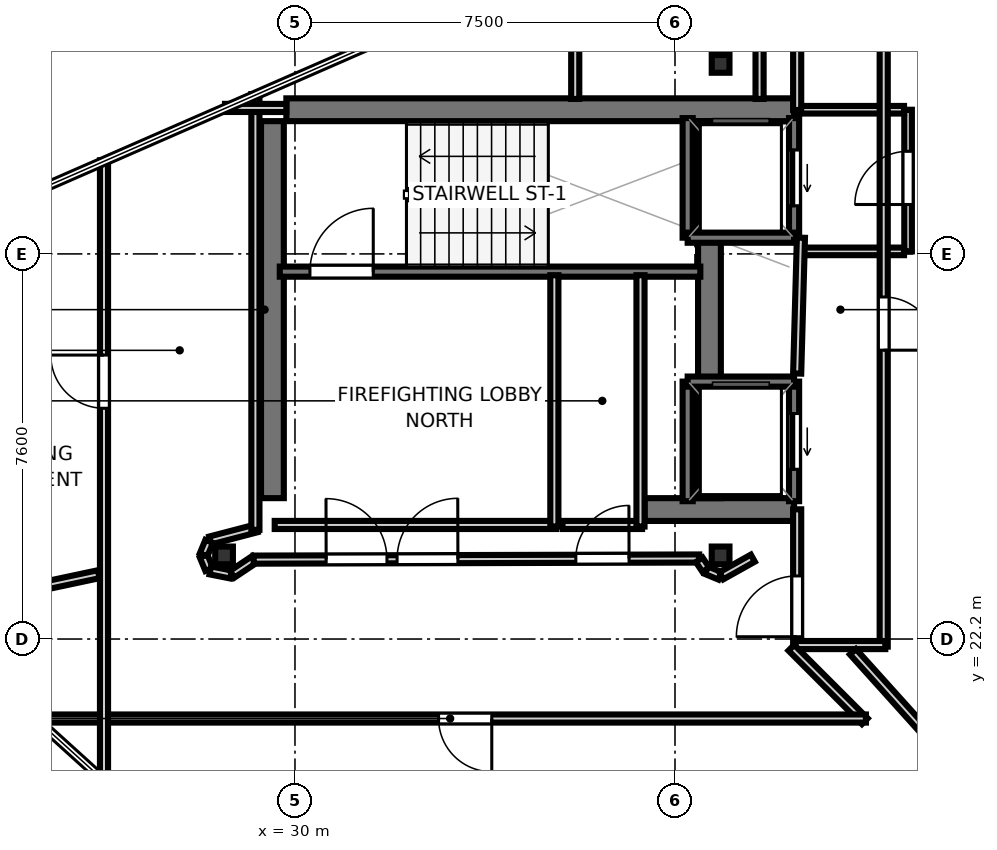
"""IFC4 building model, lengths in metres.
Left out: names, types, materials, properties, quantities, classifications, styles, units other than length and angle.
Written with IfcOpenShell. Run it as: python <this file> out.ifc"""

import sys

from ifc_helpers import new_model, si_unit, direction, frame, frame_2d, origin, origin_2d, place, context, subcontext, project, spatial, rectangle, i_section, extrude, element, fill, save


model = new_model("IFC4")
c1 = context("Model", 3, precision=1e-05, world=origin(), true_north=direction((0.0, 1.0)))
c2 = subcontext(c1, "Body", "Model", "MODEL_VIEW")
j1 = project(units=[si_unit("LENGTHUNIT", "METRE"), si_unit("PLANEANGLEUNIT", "RADIAN")], contexts=[c1])
p1 = place(None, origin())
s1 = spatial("IfcSite", under=j1, at=p1, CompositionType="ELEMENT")
p2 = place(p1, origin())
s2 = spatial("IfcBuilding", under=s1, at=p2, CompositionType="ELEMENT")
p3 = place(p2, frame((0.0, 0.0, 363.8)))
s3 = spatial("IfcBuildingStorey", under=s2, at=p3, CompositionType="ELEMENT", Elevation=363.8)
p4 = place(p3, frame((29.83, 32.645, 0.0), z_axis=(0.0, 0.0, 1.0), x_axis=(1.0, 0.0, 0.0)))
e1 = element("IfcWall", 1, at=p4, inside=s3, PredefinedType="SHEAR", context=c2, shape_type="SweptSolid", body=[
    extrude(rectangle(XDim=10.02, YDim=0.45, at=frame_2d((5.01, 0.0))), origin(), (0.0, 0.0, 1.0), 3.55),
])
p5 = place(p3, frame((36.9, 24.755, 0.0), z_axis=(0.0, 0.0, 1.0), x_axis=(1.0, 0.0, 0.0)))
e2 = element("IfcWall", 2, at=p5, inside=s3, PredefinedType="SHEAR", context=c2, shape_type="SweptSolid", body=[
    extrude(rectangle(XDim=2.95, YDim=0.45, at=frame_2d((1.475, 0.0))), origin(), (0.0, 0.0, 1.0), 3.55),
])
for number, where, z_axis, x_axis in (
    (3, (29.555, 24.98, 0.0), (0.0, 0.0, 1.0), (0.0, 1.0, 0.0)),
    (4, (38.18, 24.98, 0.0), (0.0, 0.0, 1.0), (0.0, 1.0, 0.0)),
):
    element("IfcWall", number, at=place(p3, frame(where, z_axis=z_axis, x_axis=x_axis)), inside=s3, PredefinedType="SHEAR", context=c2, shape_type="SweptSolid", body=[
        extrude(rectangle(XDim=7.44, YDim=0.45, at=frame_2d((3.72, 0.0))), origin(), (0.0, 0.0, 1.0), 3.55),
    ])
for number, where, z_axis, x_axis in (
    (5, (28.6, 23.85, 0.0), (0.0, 0.0, 1.0), (1.0, 0.0, 0.0)),
    (6, (38.4, 33.55, 0.0), (0.0, 0.0, 1.0), (1.0, 0.0, 0.0)),
    (7, (38.4, 23.85, 0.0), (0.0, 0.0, 1.0), (1.0, 0.0, 0.0)),
):
    element("IfcColumn", number, at=place(p3, frame(where, z_axis=z_axis, x_axis=x_axis)), inside=s3, PredefinedType="COLUMN", context=c2, shape_type="SweptSolid", body=[
        extrude(i_section(OverallWidth=0.35, OverallDepth=0.35, WebThickness=0.012, FlangeThickness=0.019, at=origin_2d()), origin(), (0.0, 0.0, 1.0), 3.75),
    ])
p6 = place(p3, frame((29.7, 29.45, 0.0), z_axis=(0.0, 0.0, 1.0), x_axis=(1.0, 0.0, 0.0)))
e8 = element("IfcWall", 8, at=p6, inside=s3, PredefinedType="SOLIDWALL", context=c2, shape_type="SweptSolid", body=[
    extrude(rectangle(XDim=8.3, YDim=0.2, at=frame_2d((4.15, 0.0))), origin(), (0.0, 0.0, 1.0), 3.55),
])
p7 = place(p6, frame((0.595, 0.0, 0.0)))
e9 = element("IfcOpeningElement", 9, at=p7, cuts=e8, PredefinedType="OPENING", context=c2, shape_type="SweptSolid", body=[
    extrude(rectangle(XDim=1.25, YDim=2.15, at=frame_2d((0.625, 1.075))), frame((0.0, 0.11, 0.0), z_axis=(0.0, -1.0, 0.0), x_axis=(1.0, 0.0, 0.0)), (0.0, 0.0, 1.0), 0.22),
])
p8 = place(p3, frame((39.85, 30.12, 0.0), z_axis=(0.0, 0.0, 1.0), x_axis=(0.0, 1.0, 0.0)))
e10 = element("IfcWall", 10, at=p8, inside=s3, PredefinedType="SOLIDWALL", context=c2, shape_type="SweptSolid", body=[
    extrude(rectangle(XDim=2.36, YDim=0.2, at=frame_2d((1.18, 0.0))), origin(), (0.0, 0.0, 1.0), 3.55),
])
p9 = place(p8, frame((0.63, 0.0, 0.0)))
e11 = element("IfcOpeningElement", 11, at=p9, cuts=e10, PredefinedType="OPENING", context=c2, shape_type="SweptSolid", body=[
    extrude(rectangle(XDim=1.1, YDim=2.15, at=frame_2d((0.55, 1.075))), frame((0.0, 0.11, 0.0), z_axis=(0.0, -1.0, 0.0), x_axis=(1.0, 0.0, 0.0)), (0.0, 0.0, 1.0), 0.22),
])
p10 = place(p3, frame((37.75, 30.12, 0.0), z_axis=(0.0, 0.0, 1.0), x_axis=(0.0, 1.0, 0.0)))
e12 = element("IfcWall", 12, at=p10, inside=s3, PredefinedType="SOLIDWALL", context=c2, shape_type="SweptSolid", body=[
    extrude(rectangle(XDim=2.36, YDim=0.2, at=frame_2d((1.18, 0.0))), origin(), (0.0, 0.0, 1.0), 3.55),
])
p11 = place(p3, frame((37.75, 30.12, 0.0), z_axis=(0.0, 0.0, 1.0), x_axis=(1.0, 0.0, 0.0)))
e13 = element("IfcWall", 13, at=p11, inside=s3, PredefinedType="SOLIDWALL", context=c2, shape_type="SweptSolid", body=[
    extrude(rectangle(XDim=2.1, YDim=0.2, at=frame_2d((1.05, 0.0))), origin(), (0.0, 0.0, 1.0), 3.55),
])
p12 = place(p3, frame((39.85, 24.92, 0.0), z_axis=(0.0, 0.0, 1.0), x_axis=(0.0, 1.0, 0.0)))
e14 = element("IfcWall", 14, at=p12, inside=s3, PredefinedType="SOLIDWALL", context=c2, shape_type="SweptSolid", body=[
    extrude(rectangle(XDim=2.36, YDim=0.2, at=frame_2d((1.18, 0.0))), origin(), (0.0, 0.0, 1.0), 3.55),
])
p13 = place(p12, frame((0.63, 0.0, 0.0)))
e15 = element("IfcOpeningElement", 15, at=p13, cuts=e14, PredefinedType="OPENING", context=c2, shape_type="SweptSolid", body=[
    extrude(rectangle(XDim=1.1, YDim=2.15, at=frame_2d((0.55, 1.075))), frame((0.0, 0.11, 0.0), z_axis=(0.0, -1.0, 0.0), x_axis=(1.0, 0.0, 0.0)), (0.0, 0.0, 1.0), 0.22),
])
p14 = place(p3, frame((37.75, 24.92, 0.0), z_axis=(0.0, 0.0, 1.0), x_axis=(0.0, 1.0, 0.0)))
e16 = element("IfcWall", 16, at=p14, inside=s3, PredefinedType="SOLIDWALL", context=c2, shape_type="SweptSolid", body=[
    extrude(rectangle(XDim=2.36, YDim=0.2, at=frame_2d((1.18, 0.0))), origin(), (0.0, 0.0, 1.0), 3.55),
])
p15 = place(p3, frame((37.75, 27.28, 0.0), z_axis=(0.0, 0.0, 1.0), x_axis=(1.0, 0.0, 0.0)))
e17 = element("IfcWall", 17, at=p15, inside=s3, PredefinedType="SOLIDWALL", context=c2, shape_type="SweptSolid", body=[
    extrude(rectangle(XDim=2.1, YDim=0.2, at=frame_2d((1.05, 0.0))), origin(), (0.0, 0.0, 1.0), 3.55),
])
p16 = place(p3, frame((42.1, 29.85, 0.0), z_axis=(0.0, 0.0, 1.0), x_axis=(0.0, 1.0, 0.0)))
e18 = element("IfcWall", 18, at=p16, inside=s3, PredefinedType="PARTITIONING", context=c2, shape_type="SweptSolid", body=[
    extrude(rectangle(XDim=2.795, YDim=0.15, at=frame_2d((1.397, 0.0))), origin(), (0.0, 0.0, 1.0), 2.87),
])
p17 = place(p16, frame((0.925, 0.0, 0.0)))
e19 = element("IfcOpeningElement", 19, at=p17, cuts=e18, PredefinedType="OPENING", context=c2, shape_type="SweptSolid", body=[
    extrude(rectangle(XDim=1.05, YDim=2.15, at=frame_2d((0.525, 1.075))), frame((0.0, 0.085, 0.0), z_axis=(0.0, -1.0, 0.0), x_axis=(1.0, 0.0, 0.0)), (0.0, 0.0, 1.0), 0.17),
])
for number, where, z_axis, x_axis in (
    (20, (39.96, 29.85, 0.0), (0.0, 0.0, 1.0), (1.0, 0.0, 0.0)),
    (21, (39.96, 32.645, 0.0), (0.0, 0.0, 1.0), (1.0, 0.0, 0.0)),
):
    element("IfcWall", number, at=place(p3, frame(where, z_axis=z_axis, x_axis=x_axis)), inside=s3, PredefinedType="PARTITIONING", context=c2, shape_type="SweptSolid", body=[
        extrude(rectangle(XDim=2.06, YDim=0.15, at=frame_2d((1.03, 0.0))), origin(), (0.0, 0.0, 1.0), 2.87),
    ])
p18 = place(p3, frame((35.15, 24.451, 0.0), z_axis=(0.0, 0.0, 1.0), x_axis=(-1.0, 0.0, 0.0)))
e22 = element("IfcWall", 22, at=p18, inside=s3, PredefinedType="PARTITIONING", context=c2, shape_type="SweptSolid", body=[
    extrude(rectangle(XDim=5.55, YDim=0.16, at=frame_2d((2.775, 0.0))), origin(), (0.0, 0.0, 1.0), 2.87),
])
p19 = place(p3, frame((35.119, 29.38, 0.0), z_axis=(0.0, 0.0, 1.0), x_axis=(0.0, -1.0, 0.0)))
e23 = element("IfcWall", 23, at=p19, inside=s3, PredefinedType="PARTITIONING", context=c2, shape_type="SweptSolid", body=[
    extrude(rectangle(XDim=4.96, YDim=0.16, at=frame_2d((2.48, 0.0))), origin(), (0.0, 0.0, 1.0), 2.08),
])
p20 = place(p3, frame((39.911, 22.05, 0.0), z_axis=(0.0, 0.0, 1.0), x_axis=(0.0, 1.0, 0.0)))
e24 = element("IfcWall", 24, at=p20, inside=s3, PredefinedType="PARTITIONING", context=c2, shape_type="SweptSolid", body=[
    extrude(rectangle(XDim=2.71, YDim=0.16, at=frame_2d((1.355, 0.0))), origin(), (0.0, 0.0, 1.0), 2.87),
])
p21 = place(p20, frame((0.195, 0.0, 0.0)))
e25 = element("IfcOpeningElement", 25, at=p21, cuts=e24, PredefinedType="OPENING", context=c2, shape_type="SweptSolid", body=[
    extrude(rectangle(XDim=1.2, YDim=2.15, at=frame_2d((0.6, 1.075))), frame((0.0, 0.09, 0.0), z_axis=(0.0, -1.0, 0.0), x_axis=(1.0, 0.0, 0.0)), (0.0, 0.0, 1.0), 0.18),
])
p22 = place(p3, frame((39.911, 27.439, 0.0), z_axis=(0.0, 0.0, 1.0), x_axis=(0.027673579092, 0.999617013171, 0.0)))
e26 = element("IfcWall", 26, at=p22, inside=s3, PredefinedType="PARTITIONING", context=c2, shape_type="SweptSolid", body=[
    extrude(rectangle(XDim=2.682, YDim=0.16, at=frame_2d((1.341, 0.0))), origin(), (0.0, 0.0, 1.0), 2.87),
])
p23 = place(p3, frame((39.911, 32.64, 0.0), z_axis=(0.0, 0.0, 1.0), x_axis=(0.0, 1.0, 0.0)))
e27 = element("IfcWall", 27, at=p23, inside=s3, PredefinedType="PARTITIONING", context=c2, shape_type="SweptSolid", body=[
    extrude(rectangle(XDim=2.16, YDim=0.16, at=frame_2d((1.08, 0.0))), origin(), (0.0, 0.0, 1.0), 2.87),
])
p24 = place(p3, frame((41.619, 34.8, 0.0), z_axis=(0.0, 0.0, 1.0), x_axis=(0.0, -1.0, 0.0)))
e28 = element("IfcWall", 28, at=p24, inside=s3, PredefinedType="PARTITIONING", context=c2, shape_type="SweptSolid", body=[
    extrude(rectangle(XDim=12.75, YDim=0.16, at=frame_2d((6.375, 0.0))), origin(), (0.0, 0.0, 1.0), 2.87),
])
p25 = place(p24, frame((5.85, 0.0, 0.0)))
e29 = element("IfcOpeningElement", 29, at=p25, cuts=e28, PredefinedType="OPENING", context=c2, shape_type="SweptSolid", body=[
    extrude(rectangle(XDim=1.05, YDim=2.15, at=frame_2d((0.525, 1.075))), frame((0.0, 0.09, 0.0), z_axis=(0.0, -1.0, 0.0), x_axis=(1.0, 0.0, 0.0)), (0.0, 0.0, 1.0), 0.18),
])
p26 = place(p3, frame((41.65, 22.081, 0.0), z_axis=(0.0, 0.0, 1.0), x_axis=(-1.0, 0.0, 0.0)))
e30 = element("IfcWall", 30, at=p26, inside=s3, PredefinedType="PARTITIONING", context=c2, shape_type="SweptSolid", body=[
    extrude(rectangle(XDim=1.77, YDim=0.16, at=frame_2d((0.885, 0.0))), origin(), (0.0, 0.0, 1.0), 2.87),
])
p27 = place(p3, frame((36.85, 24.451, 0.0), z_axis=(0.0, 0.0, 1.0), x_axis=(-1.0, 0.0, 0.0)))
e31 = element("IfcWall", 31, at=p27, inside=s3, PredefinedType="PARTITIONING", context=c2, shape_type="SweptSolid", body=[
    extrude(rectangle(XDim=1.57, YDim=0.16, at=frame_2d((0.785, 0.0))), origin(), (0.0, 0.0, 1.0), 2.87),
])
p28 = place(p3, frame((36.819, 29.38, 0.0), z_axis=(0.0, 0.0, 1.0), x_axis=(0.0, -1.0, 0.0)))
e32 = element("IfcWall", 32, at=p28, inside=s3, PredefinedType="PARTITIONING", context=c2, shape_type="SweptSolid", body=[
    extrude(rectangle(XDim=4.96, YDim=0.16, at=frame_2d((2.48, 0.0))), origin(), (0.0, 0.0, 1.0), 2.87),
])
p29 = place(p3, frame((35.531, 32.858, 0.0), z_axis=(0.0, 0.0, 1.0), x_axis=(0.0, 1.0, 0.0)))
e33 = element("IfcWall", 33, at=p29, inside=s3, PredefinedType="PARTITIONING", context=c2, shape_type="SweptSolid", body=[
    extrude(rectangle(XDim=2.856, YDim=0.16, at=frame_2d((1.428, 0.0))), origin(), (0.0, 0.0, 1.0), 2.87),
])
p30 = place(p3, frame((39.169, 35.1, 0.0), z_axis=(0.0, 0.0, 1.0), x_axis=(0.0, -1.0, 0.0)))
e34 = element("IfcWall", 34, at=p30, inside=s3, PredefinedType="PARTITIONING", context=c2, shape_type="SweptSolid", body=[
    extrude(rectangle(XDim=2.242, YDim=0.16, at=frame_2d((1.121, 0.0))), origin(), (0.0, 0.0, 1.0), 2.87),
])
p31 = place(p3, frame((29.242, 24.384, 0.0), z_axis=(0.0, 0.0, 1.0), x_axis=(-0.967554205956, -0.252663528309, 0.0)))
e35 = element("IfcWall", 35, at=p31, inside=s3, PredefinedType="PARTITIONING", context=c2, shape_type="SweptSolid", body=[
    extrude(rectangle(XDim=0.946, YDim=0.16, at=frame_2d((0.473, 0.0))), origin(), (0.0, 0.0, 1.0), 2.87),
])
for number, where, z_axis, x_axis in (
    (36, (28.306, 24.127, 0.0), (0.0, 0.0, 1.0), (-0.383, -0.924, 0.0)),
    (37, (28.196, 23.838, 0.0), (0.0, 0.0, 1.0), (0.383, -0.924, 0.0)),
):
    element("IfcWall", number, at=place(p3, frame(where, z_axis=z_axis, x_axis=x_axis)), inside=s3, PredefinedType="PARTITIONING", context=c2, shape_type="SweptSolid", body=[
        extrude(rectangle(XDim=0.287, YDim=0.16, at=frame_2d((0.144, 0.0))), origin(), (0.0, 0.0, 1.0), 2.87),
    ])
p32 = place(p3, frame((28.329, 23.554, 0.0), z_axis=(0.0, 0.0, 1.0), x_axis=(0.980782960085, -0.195101986683, 0.0)))
e38 = element("IfcWall", 38, at=p32, inside=s3, PredefinedType="PARTITIONING", context=c2, shape_type="SweptSolid", body=[
    extrude(rectangle(XDim=0.417, YDim=0.16, at=frame_2d((0.208, 0.0))), origin(), (0.0, 0.0, 1.0), 2.87),
])
p33 = place(p3, frame((28.761, 23.478, 0.0), z_axis=(0.0, 0.0, 1.0), x_axis=(0.831482899293, 0.555550347118, 0.0)))
e39 = element("IfcWall", 39, at=p33, inside=s3, PredefinedType="PARTITIONING", context=c2, shape_type="SweptSolid", body=[
    extrude(rectangle(XDim=0.53, YDim=0.16, at=frame_2d((0.265, 0.0))), origin(), (0.0, 0.0, 1.0), 2.87),
])
p34 = place(p3, frame((29.184, 23.767, 0.0), z_axis=(0.0, 0.0, 1.0), x_axis=(0.999996878137, 0.002498742824, 0.0)))
e40 = element("IfcWall", 40, at=p34, inside=s3, PredefinedType="PARTITIONING", context=c2, shape_type="SweptSolid", body=[
    extrude(rectangle(XDim=8.793, YDim=0.16, at=frame_2d((4.397, 0.0))), origin(), (0.0, 0.0, 1.0), 2.87),
])
p35 = place(p34, frame((2.831, 0.0, 0.0)))
e41 = element("IfcOpeningElement", 41, at=p35, cuts=e40, PredefinedType="OPENING", context=c2, shape_type="SweptSolid", body=[
    extrude(rectangle(XDim=1.2, YDim=2.15, at=frame_2d((0.6, 1.075))), frame((0.0, 0.09, 0.0), z_axis=(0.0, -1.0, 0.0), x_axis=(1.0, 0.0, 0.0)), (0.0, 0.0, 1.0), 0.18),
])
p36 = place(p34, frame((6.359, 0.0, 0.0)))
e42 = element("IfcOpeningElement", 42, at=p36, cuts=e40, PredefinedType="OPENING", context=c2, shape_type="SweptSolid", body=[
    extrude(rectangle(XDim=1.05, YDim=2.15, at=frame_2d((0.525, 1.075))), frame((0.0, 0.09, 0.0), z_axis=(0.0, -1.0, 0.0), x_axis=(1.0, 0.0, 0.0)), (0.0, 0.0, 1.0), 0.18),
])
p37 = place(p34, frame((1.431, 0.0, 0.0)))
e43 = element("IfcOpeningElement", 43, at=p37, cuts=e40, PredefinedType="OPENING", context=c2, shape_type="SweptSolid", body=[
    extrude(rectangle(XDim=1.2, YDim=2.15, at=frame_2d((0.6, 1.075))), frame((0.0, 0.09, 0.0), z_axis=(0.0, -1.0, 0.0), x_axis=(1.0, 0.0, 0.0)), (0.0, 0.0, 1.0), 0.18),
])
p38 = place(p3, frame((37.978, 23.764, 0.0), z_axis=(0.0, 0.0, 1.0), x_axis=(0.556130652598, -0.831094878604, 0.0)))
e44 = element("IfcWall", 44, at=p38, inside=s3, PredefinedType="PARTITIONING", context=c2, shape_type="SweptSolid", body=[
    extrude(rectangle(XDim=0.236, YDim=0.16, at=frame_2d((0.118, 0.0))), origin(), (0.0, 0.0, 1.0), 2.87),
])
p39 = place(p3, frame((38.123, 23.556, 0.0), z_axis=(0.0, 0.0, 1.0), x_axis=(0.92383017907, -0.382802560388, 0.0)))
e45 = element("IfcWall", 45, at=p39, inside=s3, PredefinedType="PARTITIONING", context=c2, shape_type="SweptSolid", body=[
    extrude(rectangle(XDim=0.287, YDim=0.16, at=frame_2d((0.144, 0.0))), origin(), (0.0, 0.0, 1.0), 2.87),
])
p40 = place(p3, frame((38.415, 23.448, 0.0), z_axis=(0.0, 0.0, 1.0), x_axis=(0.872599584194, 0.488436245241, 0.0)))
e46 = element("IfcWall", 46, at=p40, inside=s3, PredefinedType="PARTITIONING", context=c2, shape_type="SweptSolid", body=[
    extrude(rectangle(XDim=0.712, YDim=0.16, at=frame_2d((0.356, 0.0))), origin(), (0.0, 0.0, 1.0), 2.87),
])
p41 = place(p3, frame((39.796, 22.028, 0.0), z_axis=(0.0, 0.0, 1.0), x_axis=(0.707106781187, -0.707106781187, 0.0)))
e47 = element("IfcWall", 47, at=p41, inside=s3, PredefinedType="PARTITIONING", context=c2, shape_type="SweptSolid", body=[
    extrude(rectangle(XDim=2.051, YDim=0.16, at=frame_2d((1.025, 0.0))), origin(), (0.0, 0.0, 1.0), 2.87),
])
p42 = place(p3, frame((41.268, 20.631, 0.0), z_axis=(0.0, 0.0, 1.0), x_axis=(-1.0, 0.0, 0.0)))
e48 = element("IfcWall", 48, at=p42, inside=s3, PredefinedType="PARTITIONING", context=c2, shape_type="SweptSolid", body=[
    extrude(rectangle(XDim=16.412, YDim=0.16, at=frame_2d((8.206, 0.0))), origin(), (0.0, 0.0, 1.0), 2.87),
])
p43 = place(p42, frame((7.384, 0.0, 0.0)))
e49 = element("IfcOpeningElement", 49, at=p43, cuts=e48, PredefinedType="OPENING", context=c2, shape_type="SweptSolid", body=[
    extrude(rectangle(XDim=1.05, YDim=2.15, at=frame_2d((0.525, 1.075))), frame((0.0, 0.09, 0.0), z_axis=(0.0, -1.0, 0.0), x_axis=(1.0, 0.0, 0.0)), (0.0, 0.0, 1.0), 0.18),
])
p44 = place(p3, frame((26.231, 19.385, 0.0), z_axis=(0.0, 0.0, 1.0), x_axis=(0.0, 1.0, 0.0)))
e50 = element("IfcWall", 50, at=p44, inside=s3, PredefinedType="PARTITIONING", context=c2, shape_type="SweptSolid", body=[
    extrude(rectangle(XDim=12.263, YDim=0.16, at=frame_2d((6.132, 0.0))), origin(), (0.0, 0.0, 1.0), 2.87),
])
p45 = place(p44, frame((7.369, 0.0, 0.0)))
e51 = element("IfcOpeningElement", 51, at=p45, cuts=e50, PredefinedType="OPENING", context=c2, shape_type="SweptSolid", body=[
    extrude(rectangle(XDim=1.05, YDim=2.15, at=frame_2d((0.525, 1.075))), frame((0.0, 0.09, 0.0), z_axis=(0.0, -1.0, 0.0), x_axis=(1.0, 0.0, 0.0)), (0.0, 0.0, 1.0), 0.18),
])
p46 = place(p3, frame((29.219, 32.954, 0.0), z_axis=(0.0, 0.0, 1.0), x_axis=(0.0, -1.0, 0.0)))
e52 = element("IfcWall", 52, at=p46, inside=s3, PredefinedType="PARTITIONING", context=c2, shape_type="SweptSolid", body=[
    extrude(rectangle(XDim=8.6, YDim=0.16, at=frame_2d((4.3, 0.0))), origin(), (0.0, 0.0, 1.0), 2.87),
])
p47 = place(p3, frame((22.547, 22.719, 0.0), z_axis=(0.0, 0.0, 1.0), x_axis=(0.978151559121, 0.2078930672, 0.0)))
e53 = element("IfcWall", 53, at=p47, inside=s3, PredefinedType="PARTITIONING", context=c2, shape_type="SweptSolid", body=[
    extrude(rectangle(XDim=3.659, YDim=0.16, at=frame_2d((1.83, 0.0))), origin(), (0.0, 0.0, 1.0), 2.87),
])
p48 = place(p3, frame((41.011, 21.949, 0.0), z_axis=(0.0, 0.0, 1.0), x_axis=(0.669120448738, -0.743153971315, 0.0)))
e54 = element("IfcWall", 54, at=p48, inside=s3, PredefinedType="PARTITIONING", context=c2, shape_type="SweptSolid", body=[
    extrude(rectangle(XDim=5.89, YDim=0.16, at=frame_2d((2.945, 0.0))), origin(), (0.0, 0.0, 1.0), 2.87),
])
p49 = place(p3, frame((29.83, 32.68, 0.0), z_axis=(0.0, 0.0, 1.0), x_axis=(-0.999999491903, 0.001008064004, 0.0)))
e55 = element("IfcWall", 55, at=p49, inside=s3, PredefinedType="PARTITIONING", context=c2, shape_type="SweptSolid", body=[
    extrude(rectangle(XDim=1.211, YDim=0.16, at=frame_2d((0.605, 0.0))), origin(), (0.0, 0.0, 1.0), 2.87),
])
p50 = place(p7, origin())
e56 = element("IfcDoor", 56, at=p50, inside=s3, OperationType="SINGLE_SWING_RIGHT", PredefinedType="DOOR", context=c2, shape_type="SweptSolid", body=[
    extrude(rectangle(XDim=1.25, YDim=2.15, at=frame_2d((0.625, 1.075))), frame((0.0, 0.025, 0.0), z_axis=(0.0, -1.0, 0.0), x_axis=(1.0, 0.0, 0.0)), (0.0, 0.0, 1.0), 0.05),
])
fill(e9, e56)
p51 = place(p9, origin())
e57 = element("IfcDoor", 57, at=p51, inside=s3, OperationType="SLIDING_TO_LEFT", PredefinedType="DOOR", context=c2, shape_type="SweptSolid", body=[
    extrude(rectangle(XDim=1.1, YDim=2.15, at=frame_2d((0.55, 1.075))), frame((0.0, 0.025, 0.0), z_axis=(0.0, -1.0, 0.0), x_axis=(1.0, 0.0, 0.0)), (0.0, 0.0, 1.0), 0.05),
])
fill(e11, e57)
p52 = place(p13, origin())
e58 = element("IfcDoor", 58, at=p52, inside=s3, OperationType="SLIDING_TO_LEFT", PredefinedType="DOOR", context=c2, shape_type="SweptSolid", body=[
    extrude(rectangle(XDim=1.1, YDim=2.15, at=frame_2d((0.55, 1.075))), frame((0.0, 0.025, 0.0), z_axis=(0.0, -1.0, 0.0), x_axis=(1.0, 0.0, 0.0)), (0.0, 0.0, 1.0), 0.05),
])
fill(e15, e58)
p53 = place(p17, origin())
e59 = element("IfcDoor", 59, at=p53, inside=s3, OperationType="SINGLE_SWING_LEFT", PredefinedType="DOOR", context=c2, shape_type="SweptSolid", body=[
    extrude(rectangle(XDim=1.05, YDim=2.15, at=frame_2d((0.525, 1.075))), frame((0.0, 0.025, 0.0), z_axis=(0.0, -1.0, 0.0), x_axis=(1.0, 0.0, 0.0)), (0.0, 0.0, 1.0), 0.05),
])
fill(e19, e59)
p54 = place(p35, origin())
e60 = element("IfcDoor", 60, at=p54, inside=s3, OperationType="SINGLE_SWING_RIGHT", PredefinedType="DOOR", context=c2, shape_type="SweptSolid", body=[
    extrude(rectangle(XDim=1.2, YDim=2.15, at=frame_2d((0.6, 1.075))), frame((0.0, 0.025, 0.0), z_axis=(0.0, -1.0, 0.0), x_axis=(1.0, 0.0, 0.0)), (0.0, 0.0, 1.0), 0.05),
])
fill(e41, e60)
p55 = place(p21, origin())
e61 = element("IfcDoor", 61, at=p55, inside=s3, OperationType="SINGLE_SWING_LEFT", PredefinedType="DOOR", context=c2, shape_type="SweptSolid", body=[
    extrude(rectangle(XDim=1.2, YDim=2.15, at=frame_2d((0.6, 1.075))), frame((0.0, 0.025, 0.0), z_axis=(0.0, -1.0, 0.0), x_axis=(1.0, 0.0, 0.0)), (0.0, 0.0, 1.0), 0.05),
])
fill(e25, e61)
p56 = place(p36, origin())
e62 = element("IfcDoor", 62, at=p56, inside=s3, OperationType="SINGLE_SWING_RIGHT", PredefinedType="DOOR", context=c2, shape_type="SweptSolid", body=[
    extrude(rectangle(XDim=1.05, YDim=2.15, at=frame_2d((0.525, 1.075))), frame((0.0, 0.025, 0.0), z_axis=(0.0, -1.0, 0.0), x_axis=(1.0, 0.0, 0.0)), (0.0, 0.0, 1.0), 0.05),
])
fill(e42, e62)
p57 = place(p37, origin())
e63 = element("IfcDoor", 63, at=p57, inside=s3, OperationType="SINGLE_SWING_LEFT", PredefinedType="DOOR", context=c2, shape_type="SweptSolid", body=[
    extrude(rectangle(XDim=1.2, YDim=2.15, at=frame_2d((0.6, 1.075))), frame((0.0, 0.025, 0.0), z_axis=(0.0, -1.0, 0.0), x_axis=(1.0, 0.0, 0.0)), (0.0, 0.0, 1.0), 0.05),
])
fill(e43, e63)
p58 = place(p43, origin())
e64 = element("IfcDoor", 64, at=p58, inside=s3, OperationType="SINGLE_SWING_LEFT", PredefinedType="DOOR", context=c2, shape_type="SweptSolid", body=[
    extrude(rectangle(XDim=1.05, YDim=2.15, at=frame_2d((0.525, 1.075))), frame((0.0, 0.025, 0.0), z_axis=(0.0, -1.0, 0.0), x_axis=(1.0, 0.0, 0.0)), (0.0, 0.0, 1.0), 0.05),
])
fill(e49, e64)
p59 = place(p25, origin())
e65 = element("IfcDoor", 65, at=p59, inside=s3, OperationType="SINGLE_SWING_RIGHT", PredefinedType="DOOR", context=c2, shape_type="SweptSolid", body=[
    extrude(rectangle(XDim=1.05, YDim=2.15, at=frame_2d((0.525, 1.075))), frame((0.0, 0.025, 0.0), z_axis=(0.0, -1.0, 0.0), x_axis=(1.0, 0.0, 0.0)), (0.0, 0.0, 1.0), 0.05),
])
fill(e29, e65)
p60 = place(p45, origin())
e66 = element("IfcDoor", 66, at=p60, inside=s3, OperationType="SINGLE_SWING_RIGHT", PredefinedType="DOOR", context=c2, shape_type="SweptSolid", body=[
    extrude(rectangle(XDim=1.05, YDim=2.15, at=frame_2d((0.525, 1.075))), frame((0.0, 0.025, 0.0), z_axis=(0.0, -1.0, 0.0), x_axis=(1.0, 0.0, 0.0)), (0.0, 0.0, 1.0), 0.05),
])
fill(e51, e66)
save(model, sys.argv[1])
